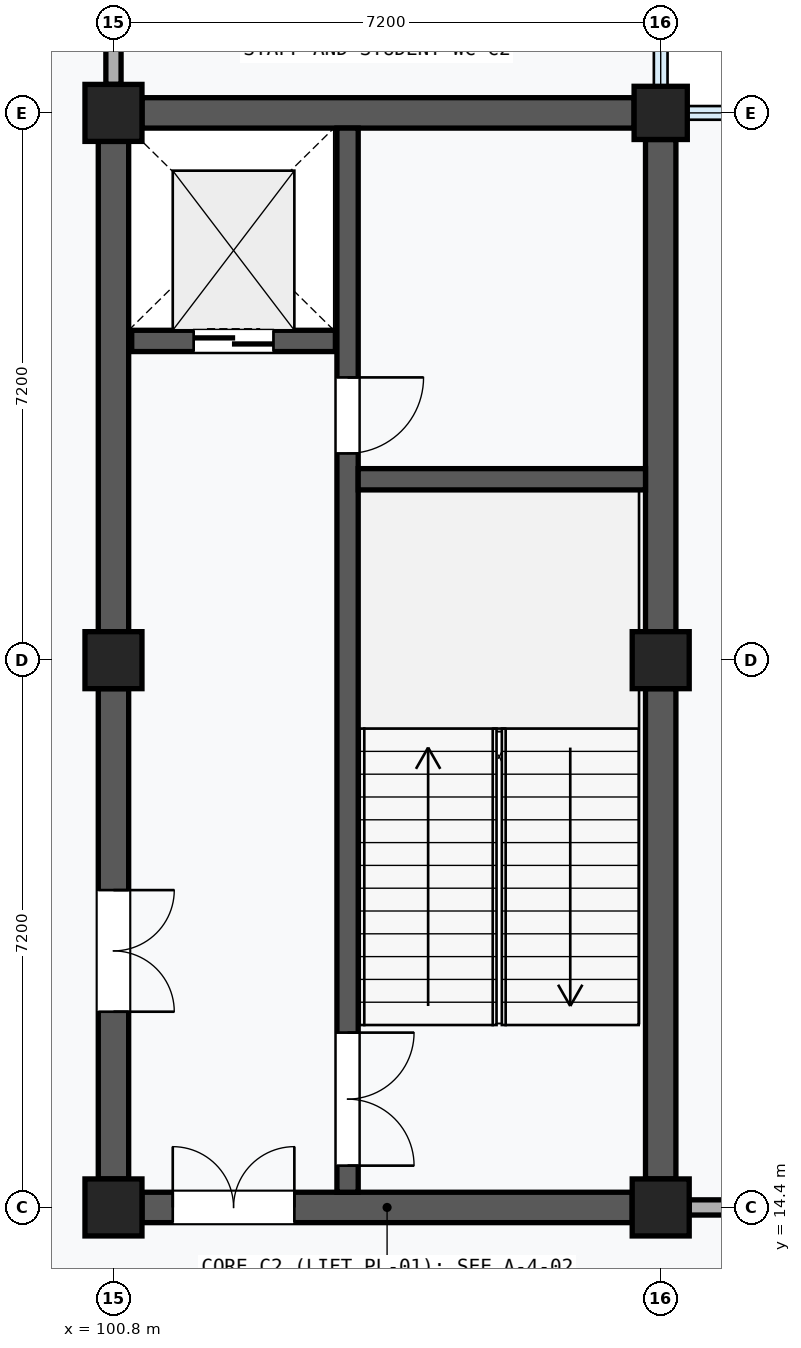
"""IFC4 building model, lengths in metres.
Left out: names, types, materials, properties, quantities, classifications, styles, units other than length and angle.
Written with IfcOpenShell. Run it as: python <this file> out.ifc"""

import sys

from ifc_helpers import new_model, si_unit, direction, frame, frame_2d, origin, origin_2d, place, context, subcontext, project, spatial, rectangle, extrude, element, fill, save


model = new_model("IFC4")
c1 = context("Model", 3, precision=1e-05, world=origin(), true_north=direction((0.0, 1.0)))
c2 = subcontext(c1, "Body", "Model", "MODEL_VIEW")
j1 = project(units=[si_unit("LENGTHUNIT", "METRE"), si_unit("PLANEANGLEUNIT", "RADIAN")], contexts=[c1])
p1 = place(None, origin())
s1 = spatial("IfcSite", under=j1, at=p1, CompositionType="ELEMENT")
p2 = place(p1, origin())
s2 = spatial("IfcBuilding", under=s1, at=p2, CompositionType="ELEMENT")
p3 = place(p2, frame((0.0, 0.0, 14.4)))
s3 = spatial("IfcBuildingStorey", under=s2, at=p3, CompositionType="ELEMENT", Elevation=14.4)
for number, where, z_axis, x_axis in (
    (1, (100.8, 14.4, 0.0), (0.0, 0.0, 1.0), (1.0, 0.0, 0.0)),
    (2, (100.8, 21.6, 0.0), (0.0, 0.0, 1.0), (1.0, 0.0, 0.0)),
    (3, (100.8, 28.8, 0.0), (0.0, 0.0, 1.0), (1.0, 0.0, 0.0)),
    (4, (108.0, 14.4, 0.0), (0.0, 0.0, 1.0), (1.0, 0.0, 0.0)),
    (5, (108.0, 21.6, 0.0), (0.0, 0.0, 1.0), (1.0, 0.0, 0.0)),
):
    element("IfcColumn", number, at=place(p3, frame(where, z_axis=z_axis, x_axis=x_axis)), inside=s3, PredefinedType="COLUMN", context=c2, shape_type="SweptSolid", body=[
        extrude(rectangle(XDim=0.75, YDim=0.75, at=origin_2d()), origin(), (0.0, 0.0, 1.0), 4.2),
    ])
p4 = place(p3, frame((108.0, 28.8, 0.0), z_axis=(0.0, 0.0, 1.0), x_axis=(1.0, 0.0, 0.0)))
e6 = element("IfcColumn", 6, at=p4, inside=s3, PredefinedType="COLUMN", context=c2, shape_type="SweptSolid", body=[
    extrude(rectangle(XDim=0.7, YDim=0.7, at=origin_2d()), origin(), (0.0, 0.0, 1.0), 4.2),
])
p5 = place(p3, frame((100.8, 14.775, 0.0), z_axis=(0.0, 0.0, 1.0), x_axis=(0.0, 1.0, 0.0)))
e7 = element("IfcWall", 7, at=p5, inside=s3, PredefinedType="SHEAR", context=c2, shape_type="SweptSolid", body=[
    extrude(rectangle(XDim=6.45, YDim=0.4, at=frame_2d((3.225, 0.0))), origin(), (0.0, 0.0, 1.0), 3.17),
])
p6 = place(p5, frame((2.2, 0.0, 0.0)))
e8 = element("IfcOpeningElement", 8, at=p6, cuts=e7, PredefinedType="OPENING", context=c2, shape_type="SweptSolid", body=[
    extrude(rectangle(XDim=1.6, YDim=2.2, at=frame_2d((0.8, 1.1))), frame((0.0, 0.212, 0.0), z_axis=(0.0, -1.0, 0.0), x_axis=(1.0, 0.0, 0.0)), (0.0, 0.0, 1.0), 0.424),
])
p7 = place(p3, frame((100.8, 21.975, 0.0), z_axis=(0.0, 0.0, 1.0), x_axis=(0.0, 1.0, 0.0)))
e9 = element("IfcWall", 9, at=p7, inside=s3, PredefinedType="SHEAR", context=c2, shape_type="SweptSolid", body=[
    extrude(rectangle(XDim=6.45, YDim=0.4, at=frame_2d((3.225, 0.0))), origin(), (0.0, 0.0, 1.0), 3.17),
])
p8 = place(p3, frame((108.0, 14.775, 0.0), z_axis=(0.0, 0.0, 1.0), x_axis=(0.0, 1.0, 0.0)))
e10 = element("IfcWall", 10, at=p8, inside=s3, PredefinedType="SHEAR", context=c2, shape_type="SweptSolid", body=[
    extrude(rectangle(XDim=6.45, YDim=0.4, at=frame_2d((3.225, 0.0))), origin(), (0.0, 0.0, 1.0), 3.17),
])
p9 = place(p3, frame((108.0, 21.975, 0.0), z_axis=(0.0, 0.0, 1.0), x_axis=(0.0, 1.0, 0.0)))
e11 = element("IfcWall", 11, at=p9, inside=s3, PredefinedType="SHEAR", context=c2, shape_type="SweptSolid", body=[
    extrude(rectangle(XDim=6.475, YDim=0.4, at=frame_2d((3.237, 0.0))), origin(), (0.0, 0.0, 1.0), 3.17),
])
p10 = place(p3, frame((101.175, 14.4, 0.0), z_axis=(0.0, 0.0, 1.0), x_axis=(1.0, 0.0, 0.0)))
e12 = element("IfcWall", 12, at=p10, inside=s3, PredefinedType="SHEAR", context=c2, shape_type="SweptSolid", body=[
    extrude(rectangle(XDim=6.45, YDim=0.4, at=frame_2d((3.225, 0.0))), origin(), (0.0, 0.0, 1.0), 3.24),
])
p11 = place(p10, frame((0.405, 0.0, 0.0)))
e13 = element("IfcOpeningElement", 13, at=p11, cuts=e12, PredefinedType="OPENING", context=c2, shape_type="SweptSolid", body=[
    extrude(rectangle(XDim=1.6, YDim=2.2, at=frame_2d((0.8, 1.1))), frame((0.0, 0.212, 0.0), z_axis=(0.0, -1.0, 0.0), x_axis=(1.0, 0.0, 0.0)), (0.0, 0.0, 1.0), 0.424),
])
p12 = place(p3, frame((101.175, 28.8, 0.0), z_axis=(0.0, 0.0, 1.0), x_axis=(1.0, 0.0, 0.0)))
e14 = element("IfcWall", 14, at=p12, inside=s3, PredefinedType="SHEAR", context=c2, shape_type="SweptSolid", body=[
    extrude(rectangle(XDim=6.475, YDim=0.4, at=frame_2d((3.237, 0.0))), origin(), (0.0, 0.0, 1.0), 3.17),
])
p13 = place(p3, frame((103.88, 14.6, 0.0), z_axis=(0.0, 0.0, 1.0), x_axis=(0.0, 1.0, 0.0)))
e15 = element("IfcWall", 15, at=p13, inside=s3, PredefinedType="SHEAR", context=c2, shape_type="SweptSolid", body=[
    extrude(rectangle(XDim=14.0, YDim=0.28, at=frame_2d((7.0, 0.0))), origin(), (0.0, 0.0, 1.0), 3.94),
])
p14 = place(p13, frame((0.35, 0.0, 0.0)))
e16 = element("IfcOpeningElement", 16, at=p14, cuts=e15, PredefinedType="OPENING", context=c2, shape_type="SweptSolid", body=[
    extrude(rectangle(XDim=1.75, YDim=2.15, at=frame_2d((0.875, 1.075))), frame((0.0, 0.152, 0.0), z_axis=(0.0, -1.0, 0.0), x_axis=(1.0, 0.0, 0.0)), (0.0, 0.0, 1.0), 0.304),
])
p15 = place(p13, frame((9.72, 0.0, 0.0)))
e17 = element("IfcOpeningElement", 17, at=p15, cuts=e15, PredefinedType="OPENING", context=c2, shape_type="SweptSolid", body=[
    extrude(rectangle(XDim=1.0, YDim=2.15, at=frame_2d((0.5, 1.075))), frame((0.0, 0.152, 0.0), z_axis=(0.0, -1.0, 0.0), x_axis=(1.0, 0.0, 0.0)), (0.0, 0.0, 1.0), 0.304),
])
p16 = place(p3, frame((104.02, 23.98, 0.0), z_axis=(0.0, 0.0, 1.0), x_axis=(1.0, 0.0, 0.0)))
e18 = element("IfcWall", 18, at=p16, inside=s3, PredefinedType="SHEAR", context=c2, shape_type="SweptSolid", body=[
    extrude(rectangle(XDim=3.78, YDim=0.28, at=frame_2d((1.89, 0.0))), origin(), (0.0, 0.0, 1.0), 3.94),
])
p17 = place(p3, frame((101.04, 25.8, 0.0), z_axis=(0.0, 0.0, 1.0), x_axis=(1.0, 0.0, 0.0)))
e19 = element("IfcWall", 19, at=p17, inside=s3, PredefinedType="SHEAR", context=c2, shape_type="SweptSolid", body=[
    extrude(rectangle(XDim=2.68, YDim=0.28, at=frame_2d((1.34, 0.0))), origin(), (0.0, 0.0, 1.0), 3.94),
])
p18 = place(p17, frame((0.815, 0.0, 0.0)))
e20 = element("IfcOpeningElement", 20, at=p18, cuts=e19, PredefinedType="OPENING", context=c2, shape_type="SweptSolid", body=[
    extrude(rectangle(XDim=1.05, YDim=2.2, at=frame_2d((0.525, 1.1))), frame((0.0, 0.152, 0.0), z_axis=(0.0, -1.0, 0.0), x_axis=(1.0, 0.0, 0.0)), (0.0, 0.0, 1.0), 0.304),
])
p19 = place(p3, frame((108.375, 14.4, 0.0), z_axis=(0.0, 0.0, 1.0), x_axis=(1.0, 0.0, 0.0)))
e21 = element("IfcWall", 21, at=p19, inside=s3, PredefinedType="PARTITIONING", context=c2, shape_type="SweptSolid", body=[
    extrude(rectangle(XDim=6.45, YDim=0.2, at=frame_2d((3.225, 0.0))), origin(), (0.0, 0.0, 1.0), 3.17),
])
p20 = place(p19, frame((2.725, 0.0, 0.0)))
e22 = element("IfcOpeningElement", 22, at=p20, cuts=e21, PredefinedType="OPENING", context=c2, shape_type="SweptSolid", body=[
    extrude(rectangle(XDim=1.0, YDim=2.1, at=frame_2d((0.5, 1.05))), frame((0.0, 0.112, 0.0), z_axis=(0.0, -1.0, 0.0), x_axis=(1.0, 0.0, 0.0)), (0.0, 0.0, 1.0), 0.224),
])
p21 = place(p3, frame((100.8, 29.175, 0.0), z_axis=(0.0, 0.0, 1.0), x_axis=(0.0, 1.0, 0.0)))
e23 = element("IfcWall", 23, at=p21, inside=s3, PredefinedType="PARTITIONING", context=c2, shape_type="SweptSolid", body=[
    extrude(rectangle(XDim=6.45, YDim=0.2, at=frame_2d((3.225, 0.0))), origin(), (0.0, 0.0, 1.0), 3.17),
])
p22 = place(p21, frame((2.725, 0.0, 0.0)))
e24 = element("IfcOpeningElement", 24, at=p22, cuts=e23, PredefinedType="OPENING", context=c2, shape_type="SweptSolid", body=[
    extrude(rectangle(XDim=1.0, YDim=2.1, at=frame_2d((0.5, 1.05))), frame((0.0, 0.112, 0.0), z_axis=(0.0, -1.0, 0.0), x_axis=(1.0, 0.0, 0.0)), (0.0, 0.0, 1.0), 0.224),
])
p23 = place(p6, frame((1.6, 0.0, 0.0), z_axis=(0.0, 0.0, 1.0), x_axis=(-1.0, 0.0, 0.0)))
e25 = element("IfcDoor", 25, at=p23, inside=s3, OperationType="DOUBLE_DOOR_SINGLE_SWING", PredefinedType="DOOR", context=c2, shape_type="SweptSolid", body=[
    extrude(rectangle(XDim=1.6, YDim=2.2, at=frame_2d((0.8, 1.1))), frame((0.0, 0.025, 0.0), z_axis=(0.0, -1.0, 0.0), x_axis=(1.0, 0.0, 0.0)), (0.0, 0.0, 1.0), 0.05),
])
fill(e8, e25)
p24 = place(p11, origin())
e26 = element("IfcDoor", 26, at=p24, inside=s3, OperationType="DOUBLE_DOOR_SINGLE_SWING", PredefinedType="DOOR", context=c2, shape_type="SweptSolid", body=[
    extrude(rectangle(XDim=1.6, YDim=2.2, at=frame_2d((0.8, 1.1))), frame((0.0, 0.025, 0.0), z_axis=(0.0, -1.0, 0.0), x_axis=(1.0, 0.0, 0.0)), (0.0, 0.0, 1.0), 0.05),
])
fill(e13, e26)
p25 = place(p14, frame((1.75, 0.0, 0.0), z_axis=(0.0, 0.0, 1.0), x_axis=(-1.0, 0.0, 0.0)))
e27 = element("IfcDoor", 27, at=p25, inside=s3, OperationType="DOUBLE_DOOR_SINGLE_SWING", PredefinedType="DOOR", context=c2, shape_type="SweptSolid", body=[
    extrude(rectangle(XDim=1.75, YDim=2.15, at=frame_2d((0.875, 1.075))), frame((0.0, 0.025, 0.0), z_axis=(0.0, -1.0, 0.0), x_axis=(1.0, 0.0, 0.0)), (0.0, 0.0, 1.0), 0.05),
])
fill(e16, e27)
p26 = place(p15, frame((1.0, 0.0, 0.0), z_axis=(0.0, 0.0, 1.0), x_axis=(-1.0, 0.0, 0.0)))
e28 = element("IfcDoor", 28, at=p26, inside=s3, OperationType="SINGLE_SWING_LEFT", PredefinedType="DOOR", context=c2, shape_type="SweptSolid", body=[
    extrude(rectangle(XDim=1.0, YDim=2.15, at=frame_2d((0.5, 1.075))), frame((0.0, 0.025, 0.0), z_axis=(0.0, -1.0, 0.0), x_axis=(1.0, 0.0, 0.0)), (0.0, 0.0, 1.0), 0.05),
])
fill(e17, e28)
p27 = place(p18, frame((1.05, 0.0, 0.0), z_axis=(0.0, 0.0, 1.0), x_axis=(-1.0, 0.0, 0.0)))
e29 = element("IfcDoor", 29, at=p27, inside=s3, OperationType="DOUBLE_DOOR_SLIDING", PredefinedType="DOOR", context=c2, shape_type="SweptSolid", body=[
    extrude(rectangle(XDim=1.05, YDim=2.2, at=frame_2d((0.525, 1.1))), frame((0.0, 0.025, 0.0), z_axis=(0.0, -1.0, 0.0), x_axis=(1.0, 0.0, 0.0)), (0.0, 0.0, 1.0), 0.05),
])
fill(e20, e29)
save(model, sys.argv[1])
